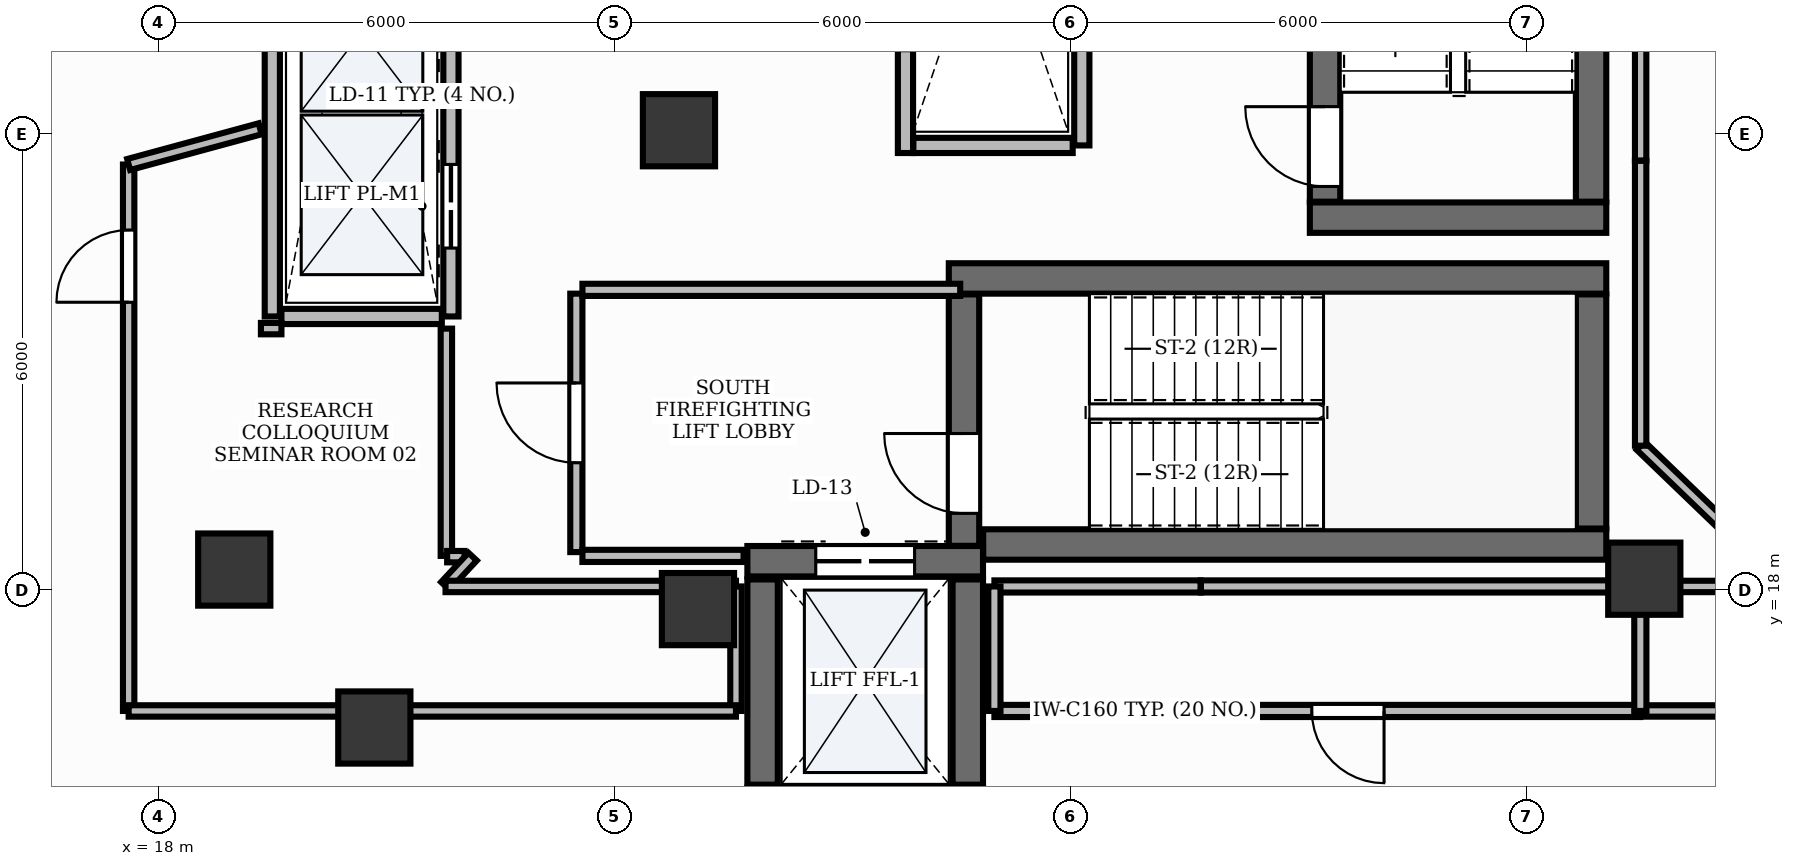
"""IFC4 building model, lengths in metres.
Left out: names, types, materials, properties, quantities, classifications, styles, units other than length and angle.
Written with IfcOpenShell. Run it as: python <this file> out.ifc"""

import sys

from ifc_helpers import new_model, si_unit, direction, frame, frame_2d, origin, origin_2d, place, context, subcontext, project, spatial, rectangle, extrude, element, fill, save


model = new_model("IFC4")
c1 = context("Model", 3, precision=1e-05, world=origin(), true_north=direction((0.0, 1.0)))
c2 = subcontext(c1, "Body", "Model", "MODEL_VIEW")
j1 = project(units=[si_unit("LENGTHUNIT", "METRE"), si_unit("PLANEANGLEUNIT", "RADIAN")], contexts=[c1])
p1 = place(None, origin())
s1 = spatial("IfcSite", under=j1, at=p1, CompositionType="ELEMENT")
p2 = place(p1, origin())
s2 = spatial("IfcBuilding", under=s1, at=p2, CompositionType="ELEMENT")
p3 = place(p2, frame((0.0, 0.0, 162.6)))
s3 = spatial("IfcBuildingStorey", under=s2, at=p3, CompositionType="ELEMENT", Elevation=162.6)
p4 = place(p3, frame((28.852, 18.6, 0.0), z_axis=(0.0, 0.0, 1.0), x_axis=(1.0, 0.0, 0.0)))
e1 = element("IfcWall", 1, at=p4, inside=s3, PredefinedType="SHEAR", context=c2, shape_type="SweptSolid", body=[
    extrude(rectangle(XDim=8.198, YDim=0.4, at=frame_2d((4.099, 0.0))), origin(), (0.0, 0.0, 1.0), 3.79),
])
p5 = place(p3, frame((28.4, 22.1, 0.0), z_axis=(0.0, 0.0, 1.0), x_axis=(1.0, 0.0, 0.0)))
e2 = element("IfcWall", 2, at=p5, inside=s3, PredefinedType="SHEAR", context=c2, shape_type="SweptSolid", body=[
    extrude(rectangle(XDim=8.65, YDim=0.4, at=frame_2d((4.325, 0.0))), origin(), (0.0, 0.0, 1.0), 3.79),
])
p6 = place(p3, frame((36.85, 18.81, 0.0), z_axis=(0.0, 0.0, 1.0), x_axis=(0.0, 1.0, 0.0)))
e3 = element("IfcWall", 3, at=p6, inside=s3, PredefinedType="SHEAR", context=c2, shape_type="SweptSolid", body=[
    extrude(rectangle(XDim=3.08, YDim=0.4, at=frame_2d((1.54, 0.0))), origin(), (0.0, 0.0, 1.0), 3.79),
])
p7 = place(p3, frame((28.6, 18.582, 0.0), z_axis=(0.0, 0.0, 1.0), x_axis=(0.0, 1.0, 0.0)))
e4 = element("IfcWall", 4, at=p7, inside=s3, PredefinedType="SHEAR", context=c2, shape_type="SweptSolid", body=[
    extrude(rectangle(XDim=3.308, YDim=0.4, at=frame_2d((1.654, 0.0))), origin(), (0.0, 0.0, 1.0), 3.79),
])
p8 = place(p7, frame((0.428, 0.0, 0.0)))
e5 = element("IfcOpeningElement", 5, at=p8, cuts=e4, PredefinedType="OPENING", context=c2, shape_type="SweptSolid", body=[
    extrude(rectangle(XDim=1.05, YDim=2.15, at=frame_2d((0.525, 1.075))), frame((0.0, 0.215, 0.0), z_axis=(0.0, -1.0, 0.0), x_axis=(1.0, 0.0, 0.0)), (0.0, 0.0, 1.0), 0.43),
])
p9 = place(p3, frame((33.15, 22.9, 0.0), z_axis=(0.0, 0.0, 1.0), x_axis=(1.0, 0.0, 0.0)))
e6 = element("IfcWall", 6, at=p9, inside=s3, PredefinedType="SHEAR", context=c2, shape_type="SweptSolid", body=[
    extrude(rectangle(XDim=3.9, YDim=0.4, at=frame_2d((1.95, 0.0))), origin(), (0.0, 0.0, 1.0), 3.79),
])
p10 = place(p3, frame((36.85, 23.11, 0.0), z_axis=(0.0, 0.0, 1.0), x_axis=(0.0, 1.0, 0.0)))
e7 = element("IfcWall", 7, at=p10, inside=s3, PredefinedType="SHEAR", context=c2, shape_type="SweptSolid", body=[
    extrude(rectangle(XDim=7.78, YDim=0.4, at=frame_2d((3.89, 0.0))), origin(), (0.0, 0.0, 1.0), 3.79),
])
p11 = place(p3, frame((33.35, 23.11, 0.0), z_axis=(0.0, 0.0, 1.0), x_axis=(0.0, 1.0, 0.0)))
e8 = element("IfcWall", 8, at=p11, inside=s3, PredefinedType="SHEAR", context=c2, shape_type="SweptSolid", body=[
    extrude(rectangle(XDim=7.78, YDim=0.4, at=frame_2d((3.89, 0.0))), origin(), (0.0, 0.0, 1.0), 3.79),
])
p12 = place(p11, frame((0.2, 0.0, 0.0)))
e9 = element("IfcOpeningElement", 9, at=p12, cuts=e8, PredefinedType="OPENING", context=c2, shape_type="SweptSolid", body=[
    extrude(rectangle(XDim=1.05, YDim=2.15, at=frame_2d((0.525, 1.075))), frame((0.0, 0.215, 0.0), z_axis=(0.0, -1.0, 0.0), x_axis=(1.0, 0.0, 0.0)), (0.0, 0.0, 1.0), 0.43),
])
p13 = place(p3, frame((25.75, 18.38, 0.0), z_axis=(0.0, 0.0, 1.0), x_axis=(1.0, 0.0, 0.0)))
e10 = element("IfcWall", 10, at=p13, inside=s3, PredefinedType="SHEAR", context=c2, shape_type="SweptSolid", body=[
    extrude(rectangle(XDim=3.1, YDim=0.4, at=frame_2d((1.55, 0.0))), origin(), (0.0, 0.0, 1.0), 3.79),
])
p14 = place(p13, frame((0.9, 0.0, 0.0)))
e11 = element("IfcOpeningElement", 11, at=p14, cuts=e10, PredefinedType="OPENING", context=c2, shape_type="SweptSolid", body=[
    extrude(rectangle(XDim=1.3, YDim=2.2, at=frame_2d((0.65, 1.1))), frame((0.0, 0.215, 0.0), z_axis=(0.0, -1.0, 0.0), x_axis=(1.0, 0.0, 0.0)), (0.0, 0.0, 1.0), 0.43),
])
for number, where, z_axis, x_axis in (
    (12, (25.95, 15.44, 0.0), (0.0, 0.0, 1.0), (0.0, 1.0, 0.0)),
    (13, (28.65, 15.44, 0.0), (0.0, 0.0, 1.0), (0.0, 1.0, 0.0)),
):
    element("IfcWall", number, at=place(p3, frame(where, z_axis=z_axis, x_axis=x_axis)), inside=s3, PredefinedType="SHEAR", context=c2, shape_type="SweptSolid", body=[
        extrude(rectangle(XDim=2.7, YDim=0.4, at=frame_2d((1.35, 0.0))), origin(), (0.0, 0.0, 1.0), 3.79),
    ])
for number, where, z_axis, x_axis in (
    (14, (24.85, 24.05, -0.0), (0.0, 0.0, 1.0), (1.0, 0.0, 0.0)),
    (15, (25.1, 17.75, -0.0), (0.0, 0.0, 1.0), (1.0, 0.0, 0.0)),
    (16, (37.55, 18.15, -0.0), (0.0, 0.0, 1.0), (1.0, 0.0, 0.0)),
):
    element("IfcColumn", number, at=place(p3, frame(where, z_axis=z_axis, x_axis=x_axis)), inside=s3, PredefinedType="PILASTER", context=c2, shape_type="SweptSolid", body=[
        extrude(rectangle(XDim=0.95, YDim=0.95, at=origin_2d()), origin(), (0.0, 0.0, 1.0), 3.791),
    ])
for number, where, z_axis, x_axis in (
    (17, (19.0, 18.27, -0.0), (0.0, 0.0, 1.0), (1.0, 0.0, 0.0)),
    (18, (20.842, 16.192, -0.0), (0.0, 0.0, 1.0), (1.0, 0.0, 0.0)),
):
    element("IfcColumn", number, at=place(p3, frame(where, z_axis=z_axis, x_axis=x_axis)), inside=s3, PredefinedType="COLUMN", context=c2, shape_type="SweptSolid", body=[
        extrude(rectangle(XDim=0.95, YDim=0.95, at=origin_2d()), origin(), (0.0, 0.0, 1.0), 3.791),
    ])
p15 = place(p3, frame((19.5, 21.6, 0.0), z_axis=(0.0, 0.0, 1.0), x_axis=(0.0, 1.0, 0.0)))
e19 = element("IfcWall", 19, at=p15, inside=s3, PredefinedType="PARTITIONING", context=c2, shape_type="SweptSolid", body=[
    extrude(rectangle(XDim=10.8, YDim=0.2, at=frame_2d((5.4, 0.0))), origin(), (0.0, 0.0, 1.0), 2.8),
])
p16 = place(p3, frame((21.85, 21.6, 0.0), z_axis=(0.0, 0.0, 1.0), x_axis=(0.0, 1.0, 0.0)))
e20 = element("IfcWall", 20, at=p16, inside=s3, PredefinedType="PARTITIONING", context=c2, shape_type="SweptSolid", body=[
    extrude(rectangle(XDim=10.8, YDim=0.2, at=frame_2d((5.4, 0.0))), origin(), (0.0, 0.0, 1.0), 2.8),
])
p17 = place(p16, frame((0.9, 0.0, 0.0)))
e21 = element("IfcOpeningElement", 21, at=p17, cuts=e20, PredefinedType="OPENING", context=c2, shape_type="SweptSolid", body=[
    extrude(rectangle(XDim=1.1, YDim=2.2, at=frame_2d((0.55, 1.1))), frame((0.0, 0.115, 0.0), z_axis=(0.0, -1.0, 0.0), x_axis=(1.0, 0.0, 0.0)), (0.0, 0.0, 1.0), 0.23),
])
p18 = place(p16, frame((3.6, 0.0, 0.0)))
e22 = element("IfcOpeningElement", 22, at=p18, cuts=e20, PredefinedType="OPENING", context=c2, shape_type="SweptSolid", body=[
    extrude(rectangle(XDim=1.1, YDim=2.2, at=frame_2d((0.55, 1.1))), frame((0.0, 0.115, 0.0), z_axis=(0.0, -1.0, 0.0), x_axis=(1.0, 0.0, 0.0)), (0.0, 0.0, 1.0), 0.23),
])
p19 = place(p16, frame((6.3, 0.0, 0.0)))
e23 = element("IfcOpeningElement", 23, at=p19, cuts=e20, PredefinedType="OPENING", context=c2, shape_type="SweptSolid", body=[
    extrude(rectangle(XDim=1.1, YDim=2.2, at=frame_2d((0.55, 1.1))), frame((0.0, 0.115, 0.0), z_axis=(0.0, -1.0, 0.0), x_axis=(1.0, 0.0, 0.0)), (0.0, 0.0, 1.0), 0.23),
])
p20 = place(p16, frame((9.0, 0.0, 0.0)))
e24 = element("IfcOpeningElement", 24, at=p20, cuts=e20, PredefinedType="OPENING", context=c2, shape_type="SweptSolid", body=[
    extrude(rectangle(XDim=1.1, YDim=2.2, at=frame_2d((0.55, 1.1))), frame((0.0, 0.115, 0.0), z_axis=(0.0, -1.0, 0.0), x_axis=(1.0, 0.0, 0.0)), (0.0, 0.0, 1.0), 0.23),
])
p21 = place(p3, frame((19.62, 21.6, 0.0), z_axis=(0.0, 0.0, 1.0), x_axis=(1.0, 0.0, 0.0)))
e25 = element("IfcWall", 25, at=p21, inside=s3, PredefinedType="PARTITIONING", context=c2, shape_type="SweptSolid", body=[
    extrude(rectangle(XDim=2.11, YDim=0.2, at=frame_2d((1.055, 0.0))), origin(), (0.0, 0.0, 1.0), 2.8),
])
p22 = place(p3, frame((27.83, 23.75, 0.0), z_axis=(0.0, 0.0, 1.0), x_axis=(0.0, 1.0, 0.0)))
e26 = element("IfcWall", 26, at=p22, inside=s3, PredefinedType="PARTITIONING", context=c2, shape_type="SweptSolid", body=[
    extrude(rectangle(XDim=1.366, YDim=0.2, at=frame_2d((0.683, 0.0))), origin(), (0.0, 0.0, 1.0), 2.8),
])
p23 = place(p3, frame((30.15, 23.85, 0.0), z_axis=(0.0, 0.0, 1.0), x_axis=(0.0, 1.0, 0.0)))
e27 = element("IfcWall", 27, at=p23, inside=s3, PredefinedType="PARTITIONING", context=c2, shape_type="SweptSolid", body=[
    extrude(rectangle(XDim=6.35, YDim=0.2, at=frame_2d((3.175, 0.0))), origin(), (0.0, 0.0, 1.0), 2.8),
])
p24 = place(p3, frame((27.934, 23.85, 0.0), z_axis=(0.0, 0.0, 1.0), x_axis=(1.0, 0.0, 0.0)))
e28 = element("IfcWall", 28, at=p24, inside=s3, PredefinedType="PARTITIONING", context=c2, shape_type="SweptSolid", body=[
    extrude(rectangle(XDim=2.096, YDim=0.2, at=frame_2d((1.048, 0.0))), origin(), (0.0, 0.0, 1.0), 2.8),
])
p25 = place(p3, frame((23.5, 18.5, 0.0), z_axis=(0.0, 0.0, 1.0), x_axis=(0.0, 1.0, 0.0)))
e29 = element("IfcWall", 29, at=p25, inside=s3, PredefinedType="PARTITIONING", context=c2, shape_type="SweptSolid", body=[
    extrude(rectangle(XDim=3.4, YDim=0.16, at=frame_2d((1.7, 0.0))), origin(), (0.0, 0.0, 1.0), 2.8),
])
p26 = place(p25, frame((1.175, 0.0, 0.0)))
e30 = element("IfcOpeningElement", 30, at=p26, cuts=e29, PredefinedType="OPENING", context=c2, shape_type="SweptSolid", body=[
    extrude(rectangle(XDim=1.05, YDim=2.15, at=frame_2d((0.525, 1.075))), frame((0.0, 0.095, 0.0), z_axis=(0.0, -1.0, 0.0), x_axis=(1.0, 0.0, 0.0)), (0.0, 0.0, 1.0), 0.19),
])
p27 = place(p3, frame((23.58, 21.95, 0.0), z_axis=(0.0, 0.0, 1.0), x_axis=(1.0, 0.0, 0.0)))
e31 = element("IfcWall", 31, at=p27, inside=s3, PredefinedType="PARTITIONING", context=c2, shape_type="SweptSolid", body=[
    extrude(rectangle(XDim=4.97, YDim=0.16, at=frame_2d((2.485, 0.0))), origin(), (0.0, 0.0, 1.0), 2.8),
])
p28 = place(p3, frame((23.58, 18.45, 0.0), z_axis=(0.0, 0.0, 1.0), x_axis=(1.0, 0.0, 0.0)))
e32 = element("IfcWall", 32, at=p28, inside=s3, PredefinedType="PARTITIONING", context=c2, shape_type="SweptSolid", body=[
    extrude(rectangle(XDim=2.12, YDim=0.16, at=frame_2d((1.06, 0.0))), origin(), (0.0, 0.0, 1.0), 2.8),
])
p29 = place(p3, frame((17.61, 16.41, 0.0), z_axis=(0.0, 0.0, 1.0), x_axis=(0.0, 1.0, 0.0)))
e33 = element("IfcWall", 33, at=p29, inside=s3, PredefinedType="PARTITIONING", context=c2, shape_type="SweptSolid", body=[
    extrude(rectangle(XDim=7.189, YDim=0.15, at=frame_2d((3.594, 0.0))), origin(), (0.0, 0.0, 1.0), 2.8),
])
p30 = place(p29, frame((5.377, 0.0, 0.0)))
e34 = element("IfcOpeningElement", 34, at=p30, cuts=e33, PredefinedType="OPENING", context=c2, shape_type="SweptSolid", body=[
    extrude(rectangle(XDim=0.95, YDim=2.15, at=frame_2d((0.475, 1.075))), frame((0.0, 0.09, 0.0), z_axis=(0.0, -1.0, 0.0), x_axis=(1.0, 0.0, 0.0)), (0.0, 0.0, 1.0), 0.18),
])
p31 = place(p3, frame((37.498, 16.41, 0.0), z_axis=(0.0, 0.0, 1.0), x_axis=(-1.0, 0.0, 0.0)))
e35 = element("IfcWall", 35, at=p31, inside=s3, PredefinedType="PARTITIONING", context=c2, shape_type="SweptSolid", body=[
    extrude(rectangle(XDim=8.498, YDim=0.16, at=frame_2d((4.249, 0.0))), origin(), (0.0, 0.0, 1.0), 2.8),
])
p32 = place(p31, frame((3.372, 0.0, 0.0)))
e36 = element("IfcOpeningElement", 36, at=p32, cuts=e35, PredefinedType="OPENING", context=c2, shape_type="SweptSolid", body=[
    extrude(rectangle(XDim=0.95, YDim=2.15, at=frame_2d((0.475, 1.075))), frame((0.0, 0.095, 0.0), z_axis=(0.0, -1.0, 0.0), x_axis=(1.0, 0.0, 0.0)), (0.0, 0.0, 1.0), 0.19),
])
p33 = place(p3, frame((44.5, 16.41, 0.0), z_axis=(0.0, 0.0, 1.0), x_axis=(-1.0, 0.0, 0.0)))
e37 = element("IfcWall", 37, at=p33, inside=s3, PredefinedType="PARTITIONING", context=c2, shape_type="SweptSolid", body=[
    extrude(rectangle(XDim=6.992, YDim=0.15, at=frame_2d((3.496, 0.0))), origin(), (0.0, 0.0, 1.0), 2.8),
])
p34 = place(p33, frame((4.334, 0.0, 0.0)))
e38 = element("IfcOpeningElement", 38, at=p34, cuts=e37, PredefinedType="OPENING", context=c2, shape_type="SweptSolid", body=[
    extrude(rectangle(XDim=0.95, YDim=2.15, at=frame_2d((0.475, 1.075))), frame((0.0, 0.09, 0.0), z_axis=(0.0, -1.0, 0.0), x_axis=(1.0, 0.0, 0.0)), (0.0, 0.0, 1.0), 0.18),
])
p35 = place(p3, frame((19.35, 21.44, 0.0), z_axis=(0.0, 0.0, 1.0), x_axis=(1.0, 0.0, 0.0)))
e39 = element("IfcWall", 39, at=p35, inside=s3, PredefinedType="PARTITIONING", context=c2, shape_type="SweptSolid", body=[
    extrude(rectangle(XDim=0.27, YDim=0.15, at=frame_2d((0.135, 0.0))), origin(), (0.0, 0.0, 1.0), 2.8),
])
p36 = place(p3, frame((21.79, 21.44, 0.0), z_axis=(0.0, 0.0, 1.0), x_axis=(0.0, -1.0, 0.0)))
e40 = element("IfcWall", 40, at=p36, inside=s3, PredefinedType="PARTITIONING", context=c2, shape_type="SweptSolid", body=[
    extrude(rectangle(XDim=2.99, YDim=0.15, at=frame_2d((1.495, 0.0))), origin(), (0.0, 0.0, 1.0), 2.8),
])
p37 = place(p3, frame((21.8, 18.44, 0.0), z_axis=(0.0, 0.0, 1.0), x_axis=(1.0, 0.0, 0.0)))
e41 = element("IfcWall", 41, at=p37, inside=s3, PredefinedType="PARTITIONING", context=c2, shape_type="SweptSolid", body=[
    extrude(rectangle(XDim=0.229, YDim=0.15, at=frame_2d((0.114, 0.0))), origin(), (0.0, 0.0, 1.0), 2.8),
])
p38 = place(p3, frame((22.135, 18.44, 0.0), z_axis=(0.0, 0.0, 1.0), x_axis=(-0.68187219697, -0.731471330265, 0.0)))
e42 = element("IfcWall", 42, at=p38, inside=s3, PredefinedType="PARTITIONING", context=c2, shape_type="SweptSolid", body=[
    extrude(rectangle(XDim=0.527, YDim=0.15, at=frame_2d((0.263, 0.0))), origin(), (0.0, 0.0, 1.0), 2.8),
])
p39 = place(p3, frame((21.779, 18.048, 0.0), z_axis=(0.0, 0.0, 1.0), x_axis=(1.0, 0.0, 0.0)))
e43 = element("IfcWall", 43, at=p39, inside=s3, PredefinedType="PARTITIONING", context=c2, shape_type="SweptSolid", body=[
    extrude(rectangle(XDim=3.821, YDim=0.15, at=frame_2d((1.91, 0.0))), origin(), (0.0, 0.0, 1.0), 2.8),
])
p40 = place(p3, frame((25.6, 18.048, 0.0), z_axis=(0.0, 0.0, 1.0), x_axis=(0.0, -1.0, 0.0)))
e44 = element("IfcWall", 44, at=p40, inside=s3, PredefinedType="PARTITIONING", context=c2, shape_type="SweptSolid", body=[
    extrude(rectangle(XDim=1.638, YDim=0.15, at=frame_2d((0.819, 0.0))), origin(), (0.0, 0.0, 1.0), 2.8),
])
p41 = place(p3, frame((25.6, 16.41, 0.0), z_axis=(0.0, 0.0, 1.0), x_axis=(-1.0, 0.0, 0.0)))
e45 = element("IfcWall", 45, at=p41, inside=s3, PredefinedType="PARTITIONING", context=c2, shape_type="SweptSolid", body=[
    extrude(rectangle(XDim=7.99, YDim=0.15, at=frame_2d((3.995, 0.0))), origin(), (0.0, 0.0, 1.0), 2.8),
])
p42 = place(p3, frame((17.61, 23.599, 0.0), z_axis=(0.0, 0.0, 1.0), x_axis=(0.96501483668, 0.262195280255, 0.0)))
e46 = element("IfcWall", 46, at=p42, inside=s3, PredefinedType="PARTITIONING", context=c2, shape_type="SweptSolid", body=[
    extrude(rectangle(XDim=1.792, YDim=0.15, at=frame_2d((0.896, 0.0))), origin(), (0.0, 0.0, 1.0), 2.8),
])
p43 = place(p3, frame((29.0, 18.048, 0.0), z_axis=(0.0, 0.0, 1.0), x_axis=(1.0, 0.0, 0.0)))
e47 = element("IfcWall", 47, at=p43, inside=s3, PredefinedType="PARTITIONING", context=c2, shape_type="SweptSolid", body=[
    extrude(rectangle(XDim=2.713, YDim=0.16, at=frame_2d((1.356, 0.0))), origin(), (0.0, 0.0, 1.0), 2.8),
])
p44 = place(p3, frame((31.717, 18.048, 0.0), z_axis=(0.0, 0.0, 1.0), x_axis=(1.0, 0.0, 0.0)))
e48 = element("IfcWall", 48, at=p44, inside=s3, PredefinedType="PARTITIONING", context=c2, shape_type="SweptSolid", body=[
    extrude(rectangle(XDim=5.781, YDim=0.16, at=frame_2d((2.89, 0.0))), origin(), (0.0, 0.0, 1.0), 2.8),
])
for number, where, z_axis, x_axis in (
    (49, (37.498, 18.048, 0.0), (0.0, 0.0, 1.0), (0.0, -1.0, 0.0)),
    (50, (29.0, 16.41, 0.0), (0.0, 0.0, 1.0), (0.0, 1.0, 0.0)),
):
    element("IfcWall", number, at=place(p3, frame(where, z_axis=z_axis, x_axis=x_axis)), inside=s3, PredefinedType="PARTITIONING", context=c2, shape_type="SweptSolid", body=[
        extrude(rectangle(XDim=1.638, YDim=0.16, at=frame_2d((0.819, 0.0))), origin(), (0.0, 0.0, 1.0), 2.8),
    ])
p45 = place(p3, frame((37.508, 18.048, 0.0), z_axis=(0.0, 0.0, 1.0), x_axis=(1.0, 0.0, 0.0)))
e51 = element("IfcWall", 51, at=p45, inside=s3, PredefinedType="PARTITIONING", context=c2, shape_type="SweptSolid", body=[
    extrude(rectangle(XDim=1.908, YDim=0.15, at=frame_2d((0.954, 0.0))), origin(), (0.0, 0.0, 1.0), 2.8),
])
p46 = place(p3, frame((39.419, 18.055, 0.0), z_axis=(0.0, 0.0, 1.0), x_axis=(-0.720561375154, 0.693391162791, 0.0)))
e52 = element("IfcWall", 52, at=p46, inside=s3, PredefinedType="PARTITIONING", context=c2, shape_type="SweptSolid", body=[
    extrude(rectangle(XDim=2.66, YDim=0.15, at=frame_2d((1.33, 0.0))), origin(), (0.0, 0.0, 1.0), 2.8),
])
p47 = place(p3, frame((37.502, 19.899, 0.0), z_axis=(0.0, 0.0, 1.0), x_axis=(0.0, 1.0, 0.0)))
e53 = element("IfcWall", 53, at=p47, inside=s3, PredefinedType="PARTITIONING", context=c2, shape_type="SweptSolid", body=[
    extrude(rectangle(XDim=3.749, YDim=0.15, at=frame_2d((1.874, 0.0))), origin(), (0.0, 0.0, 1.0), 2.8),
])
p48 = place(p3, frame((37.502, 23.652, 0.0), z_axis=(0.0, 0.0, 1.0), x_axis=(0.0, 1.0, 0.0)))
e54 = element("IfcWall", 54, at=p48, inside=s3, PredefinedType="PARTITIONING", context=c2, shape_type="SweptSolid", body=[
    extrude(rectangle(XDim=1.546, YDim=0.15, at=frame_2d((0.773, 0.0))), origin(), (0.0, 0.0, 1.0), 2.8),
])
p49 = place(p8, origin())
e55 = element("IfcDoor", 55, at=p49, inside=s3, OperationType="SINGLE_SWING_RIGHT", PredefinedType="DOOR", context=c2, shape_type="SweptSolid", body=[
    extrude(rectangle(XDim=1.05, YDim=2.15, at=frame_2d((0.525, 1.075))), frame((0.0, 0.025, 0.0), z_axis=(0.0, -1.0, 0.0), x_axis=(1.0, 0.0, 0.0)), (0.0, 0.0, 1.0), 0.05),
])
fill(e5, e55)
p50 = place(p12, origin())
e56 = element("IfcDoor", 56, at=p50, inside=s3, OperationType="SINGLE_SWING_RIGHT", PredefinedType="DOOR", context=c2, shape_type="SweptSolid", body=[
    extrude(rectangle(XDim=1.05, YDim=2.15, at=frame_2d((0.525, 1.075))), frame((0.0, 0.025, 0.0), z_axis=(0.0, -1.0, 0.0), x_axis=(1.0, 0.0, 0.0)), (0.0, 0.0, 1.0), 0.05),
])
fill(e9, e56)
p51 = place(p17, origin())
e57 = element("IfcDoor", 57, at=p51, inside=s3, OperationType="DOUBLE_DOOR_SLIDING", PredefinedType="DOOR", context=c2, shape_type="SweptSolid", body=[
    extrude(rectangle(XDim=1.1, YDim=2.2, at=frame_2d((0.55, 1.1))), frame((0.0, 0.025, 0.0), z_axis=(0.0, -1.0, 0.0), x_axis=(1.0, 0.0, 0.0)), (0.0, 0.0, 1.0), 0.05),
])
fill(e21, e57)
p52 = place(p14, origin())
e58 = element("IfcDoor", 58, at=p52, inside=s3, OperationType="DOUBLE_DOOR_SLIDING", PredefinedType="DOOR", context=c2, shape_type="SweptSolid", body=[
    extrude(rectangle(XDim=1.3, YDim=2.2, at=frame_2d((0.65, 1.1))), frame((0.0, 0.025, 0.0), z_axis=(0.0, -1.0, 0.0), x_axis=(1.0, 0.0, 0.0)), (0.0, 0.0, 1.0), 0.05),
])
fill(e11, e58)
p53 = place(p26, origin())
e59 = element("IfcDoor", 59, at=p53, inside=s3, OperationType="SINGLE_SWING_RIGHT", PredefinedType="DOOR", context=c2, shape_type="SweptSolid", body=[
    extrude(rectangle(XDim=1.05, YDim=2.15, at=frame_2d((0.525, 1.075))), frame((0.0, 0.025, 0.0), z_axis=(0.0, -1.0, 0.0), x_axis=(1.0, 0.0, 0.0)), (0.0, 0.0, 1.0), 0.05),
])
fill(e30, e59)
p54 = place(p30, origin())
e60 = element("IfcDoor", 60, at=p54, inside=s3, OperationType="SINGLE_SWING_LEFT", PredefinedType="DOOR", context=c2, shape_type="SweptSolid", body=[
    extrude(rectangle(XDim=0.95, YDim=2.15, at=frame_2d((0.475, 1.075))), frame((0.0, 0.025, 0.0), z_axis=(0.0, -1.0, 0.0), x_axis=(1.0, 0.0, 0.0)), (0.0, 0.0, 1.0), 0.05),
])
fill(e34, e60)
p55 = place(p32, origin())
e61 = element("IfcDoor", 61, at=p55, inside=s3, OperationType="SINGLE_SWING_LEFT", PredefinedType="DOOR", context=c2, shape_type="SweptSolid", body=[
    extrude(rectangle(XDim=0.95, YDim=2.15, at=frame_2d((0.475, 1.075))), frame((0.0, 0.025, 0.0), z_axis=(0.0, -1.0, 0.0), x_axis=(1.0, 0.0, 0.0)), (0.0, 0.0, 1.0), 0.05),
])
fill(e36, e61)
save(model, sys.argv[1])
